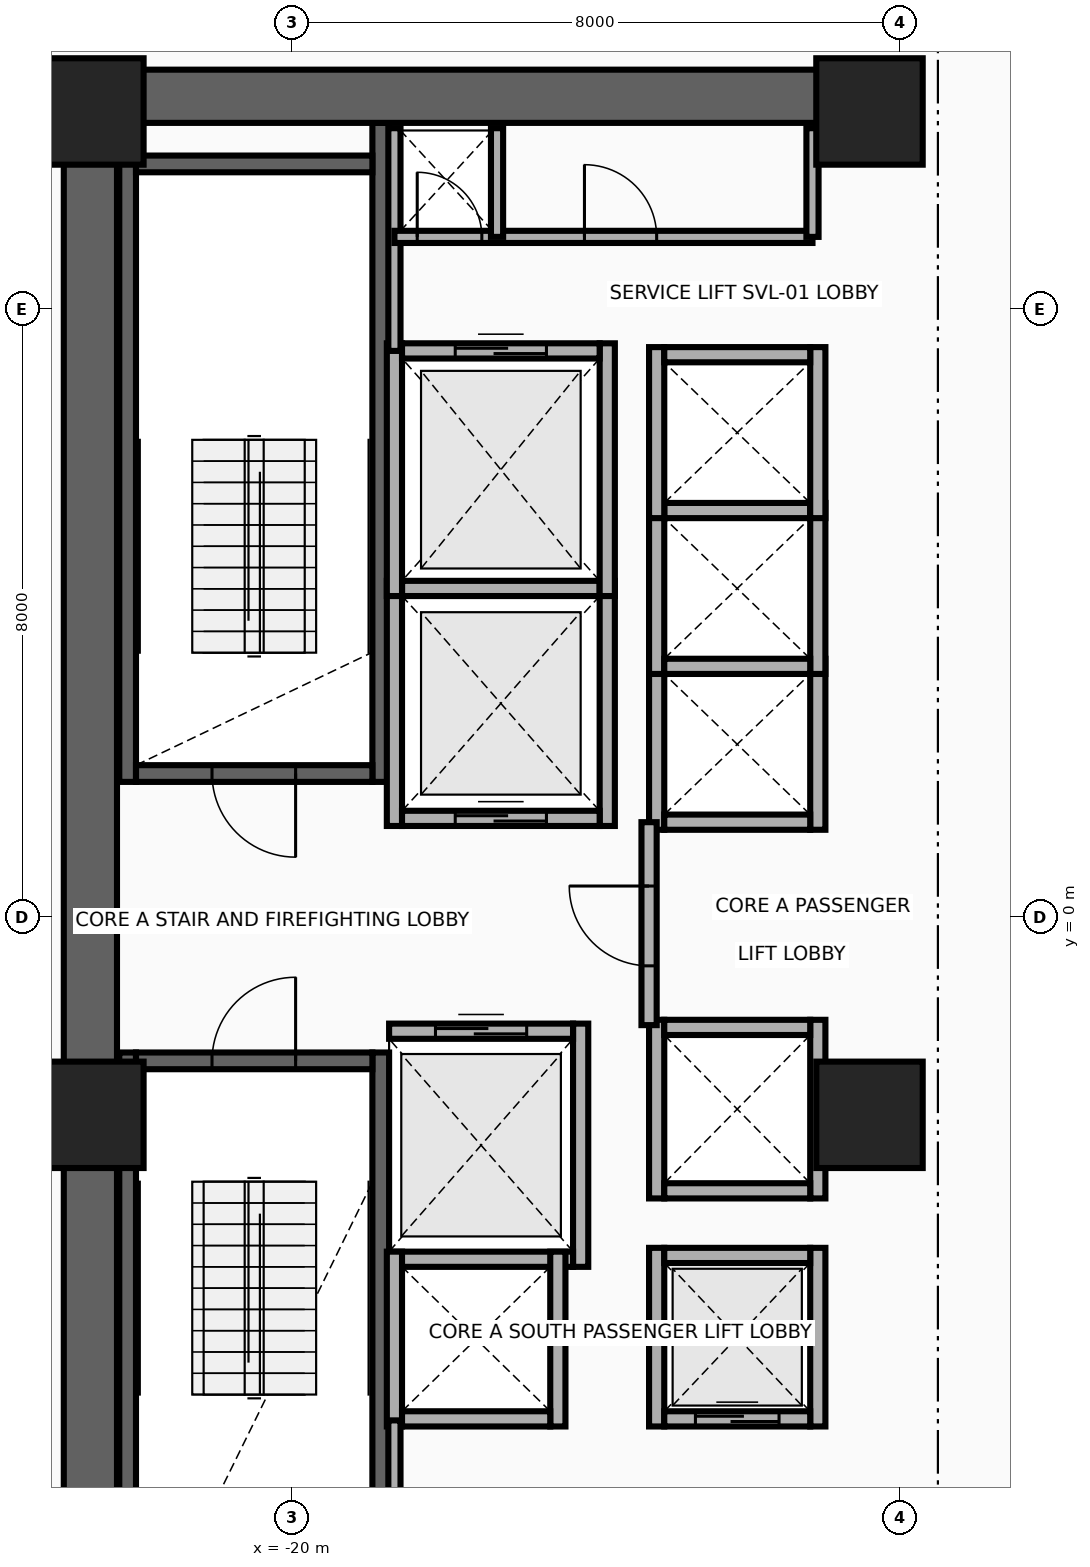
"""IFC4 building model, lengths in metres.
Left out: names, types, materials, properties, quantities, classifications, styles, units other than length and angle.
Written with IfcOpenShell. Run it as: python <this file> out.ifc"""

import sys

from ifc_helpers import new_model, si_unit, direction, frame, frame_2d, origin, origin_2d, place, context, subcontext, project, spatial, rectangle, extrude, source, transform, mapped, element, fill, save


model = new_model("IFC4")
c1 = context("Model", 3, precision=1e-05, world=origin(), true_north=direction((0.0, 1.0)))
c2 = subcontext(c1, "Body", "Model", "MODEL_VIEW")
j1 = project(units=[si_unit("LENGTHUNIT", "METRE"), si_unit("PLANEANGLEUNIT", "RADIAN")], contexts=[c1])
p1 = place(None, origin())
s1 = spatial("IfcSite", under=j1, at=p1, CompositionType="ELEMENT")
p2 = place(p1, origin())
s2 = spatial("IfcBuilding", under=s1, at=p2, CompositionType="ELEMENT")
p3 = place(p2, frame((0.0, 0.0, 51.9)))
s3 = spatial("IfcBuildingStorey", under=s2, at=p3, CompositionType="ELEMENT", Elevation=51.9)
for number, where, z_axis, x_axis in (
    (1, (-22.16, 1.78, 0.0), (0.0, 0.0, 1.0), (0.0, 1.0, 0.0)),
    (2, (-18.83, 1.78, 0.0), (0.0, 0.0, 1.0), (0.0, 1.0, 0.0)),
):
    element("IfcWall", number, at=place(p3, frame(where, z_axis=z_axis, x_axis=x_axis)), inside=s3, PredefinedType="SHEAR", context=c2, shape_type="SweptSolid", body=[
        extrude(rectangle(XDim=8.67, YDim=0.22, at=frame_2d((4.335, 0.0))), origin(), (0.0, 0.0, 1.0), 3.46),
    ])
p4 = place(p3, frame((-22.05, 1.89, 0.0), z_axis=(0.0, 0.0, 1.0), x_axis=(1.0, 0.0, 0.0)))
e3 = element("IfcWall", 3, at=p4, inside=s3, PredefinedType="SHEAR", context=c2, shape_type="SweptSolid", body=[
    extrude(rectangle(XDim=3.11, YDim=0.22, at=frame_2d((1.555, 0.0))), origin(), (0.0, 0.0, 1.0), 3.46),
])
p5 = place(p4, frame((1.0, 0.0, 0.0)))
e4 = element("IfcOpeningElement", 4, at=p5, cuts=e3, PredefinedType="OPENING", context=c2, shape_type="SweptSolid", body=[
    extrude(rectangle(XDim=1.1, YDim=2.15, at=frame_2d((0.55, 1.075))), frame((0.0, 0.125, 0.0), z_axis=(0.0, -1.0, 0.0), x_axis=(1.0, 0.0, 0.0)), (0.0, 0.0, 1.0), 0.25),
])
p6 = place(p3, frame((-22.05, 9.91, 0.0), z_axis=(0.0, 0.0, 1.0), x_axis=(1.0, 0.0, 0.0)))
e5 = element("IfcWall", 5, at=p6, inside=s3, PredefinedType="SHEAR", context=c2, shape_type="SweptSolid", body=[
    extrude(rectangle(XDim=3.11, YDim=0.22, at=frame_2d((1.555, 0.0))), origin(), (0.0, 0.0, 1.0), 3.46),
])
for number, where, z_axis, x_axis in (
    (6, (-22.16, -10.45, 0.0), (0.0, 0.0, 1.0), (0.0, 1.0, 0.0)),
    (7, (-18.83, -10.45, 0.0), (0.0, 0.0, 1.0), (0.0, 1.0, 0.0)),
):
    element("IfcWall", number, at=place(p3, frame(where, z_axis=z_axis, x_axis=x_axis)), inside=s3, PredefinedType="SHEAR", context=c2, shape_type="SweptSolid", body=[
        extrude(rectangle(XDim=8.67, YDim=0.22, at=frame_2d((4.335, 0.0))), origin(), (0.0, 0.0, 1.0), 3.46),
    ])
p7 = place(p3, frame((-22.05, -1.89, 0.0), z_axis=(0.0, 0.0, 1.0), x_axis=(1.0, 0.0, 0.0)))
e8 = element("IfcWall", 8, at=p7, inside=s3, PredefinedType="SHEAR", context=c2, shape_type="SweptSolid", body=[
    extrude(rectangle(XDim=3.11, YDim=0.22, at=frame_2d((1.555, 0.0))), origin(), (0.0, 0.0, 1.0), 3.46),
])
p8 = place(p7, frame((1.0, 0.0, 0.0)))
e9 = element("IfcOpeningElement", 9, at=p8, cuts=e8, PredefinedType="OPENING", context=c2, shape_type="SweptSolid", body=[
    extrude(rectangle(XDim=1.1, YDim=2.15, at=frame_2d((0.55, 1.075))), frame((0.0, 0.125, 0.0), z_axis=(0.0, -1.0, 0.0), x_axis=(1.0, 0.0, 0.0)), (0.0, 0.0, 1.0), 0.25),
])
p9 = place(p3, frame((-22.65, -11.15, 0.0), z_axis=(0.0, 0.0, 1.0), x_axis=(0.0, 1.0, 0.0)))
e10 = element("IfcWall", 10, at=p9, inside=s3, PredefinedType="SHEAR", context=c2, shape_type="SweptSolid", body=[
    extrude(rectangle(XDim=22.3, YDim=0.7, at=frame_2d((11.15, 0.0))), origin(), (0.0, 0.0, 1.0), 3.46),
])
p10 = place(p3, frame((-22.65, 10.8, 0.0), z_axis=(0.0, 0.0, 1.0), x_axis=(1.0, 0.0, 0.0)))
e11 = element("IfcWall", 11, at=p10, inside=s3, PredefinedType="SHEAR", context=c2, shape_type="SweptSolid", body=[
    extrude(rectangle(XDim=10.25, YDim=0.7, at=frame_2d((5.125, 0.0))), origin(), (0.0, 0.0, 1.0), 3.46),
])
m1 = source(origin(), c2, "Body", "SweptSolid", [
    extrude(rectangle(XDim=1.4, YDim=1.4, at=origin_2d()), origin(), (0.0, 0.0, 1.0), 3.7),
])
for number, where, z_axis, x_axis in (
    (12, (-22.65, -2.6, 0.0), (0.0, 0.0, 1.0), (1.0, 0.0, 0.0)),
    (13, (-12.4, -2.6, 0.0), (0.0, 0.0, 1.0), (1.0, 0.0, 0.0)),
    (14, (-22.65, 10.6, 0.0), (0.0, 0.0, 1.0), (1.0, 0.0, 0.0)),
    (15, (-12.4, 10.6, 0.0), (0.0, 0.0, 1.0), (1.0, 0.0, 0.0)),
):
    element("IfcColumn", number, at=place(p3, frame(where, z_axis=z_axis, x_axis=x_axis)), inside=s3, PredefinedType="COLUMN", context=c2, shape_type="MappedRepresentation", body=[
        mapped(m1, transform((0.0, 0.0, 0.0), x_axis=(1.0, 0.0, 0.0), y_axis=(0.0, 1.0, 0.0), z_axis=(0.0, 0.0, 1.0), scale=1.0)),
    ])
for number, where, z_axis, x_axis in (
    (16, (-18.65, 1.2, 0.0), (0.0, 0.0, 1.0), (0.0, 1.0, 0.0)),
    (17, (-15.85, 1.2, 0.0), (0.0, 0.0, 1.0), (0.0, 1.0, 0.0)),
):
    element("IfcWall", number, at=place(p3, frame(where, z_axis=z_axis, x_axis=x_axis)), inside=s3, PredefinedType="MOVABLE", context=c2, shape_type="SweptSolid", body=[
        extrude(rectangle(XDim=3.225, YDim=0.2, at=frame_2d((1.613, 0.0))), origin(), (0.0, 0.0, 1.0), 3.46),
    ])
p11 = place(p3, frame((-18.55, 1.3, 0.0), z_axis=(0.0, 0.0, 1.0), x_axis=(1.0, 0.0, 0.0)))
e18 = element("IfcWall", 18, at=p11, inside=s3, PredefinedType="MOVABLE", context=c2, shape_type="SweptSolid", body=[
    extrude(rectangle(XDim=2.6, YDim=0.2, at=frame_2d((1.3, 0.0))), origin(), (0.0, 0.0, 1.0), 3.46),
])
p12 = place(p11, frame((0.7, 0.0, 0.0)))
e19 = element("IfcOpeningElement", 19, at=p12, cuts=e18, PredefinedType="OPENING", context=c2, shape_type="SweptSolid", body=[
    extrude(rectangle(XDim=1.2, YDim=2.1, at=frame_2d((0.6, 1.05))), frame((0.0, 0.115, 0.0), z_axis=(0.0, -1.0, 0.0), x_axis=(1.0, 0.0, 0.0)), (0.0, 0.0, 1.0), 0.23),
])
p13 = place(p3, frame((-18.55, 4.325, 0.0), z_axis=(0.0, 0.0, 1.0), x_axis=(1.0, 0.0, 0.0)))
e20 = element("IfcWall", 20, at=p13, inside=s3, PredefinedType="MOVABLE", context=c2, shape_type="SweptSolid", body=[
    extrude(rectangle(XDim=2.6, YDim=0.2, at=frame_2d((1.3, 0.0))), origin(), (0.0, 0.0, 1.0), 3.46),
])
p14 = place(p3, frame((-16.2, -4.6, 0.0), z_axis=(0.0, 0.0, 1.0), x_axis=(0.0, 1.0, 0.0)))
e21 = element("IfcWall", 21, at=p14, inside=s3, PredefinedType="MOVABLE", context=c2, shape_type="SweptSolid", body=[
    extrude(rectangle(XDim=3.2, YDim=0.2, at=frame_2d((1.6, 0.0))), origin(), (0.0, 0.0, 1.0), 3.46),
])
p15 = place(p3, frame((-18.72, -4.5, 0.0), z_axis=(0.0, 0.0, 1.0), x_axis=(1.0, 0.0, 0.0)))
e22 = element("IfcWall", 22, at=p15, inside=s3, PredefinedType="MOVABLE", context=c2, shape_type="SweptSolid", body=[
    extrude(rectangle(XDim=2.42, YDim=0.2, at=frame_2d((1.21, 0.0))), origin(), (0.0, 0.0, 1.0), 3.46),
])
p16 = place(p3, frame((-18.72, -1.5, 0.0), z_axis=(0.0, 0.0, 1.0), x_axis=(1.0, 0.0, 0.0)))
e23 = element("IfcWall", 23, at=p16, inside=s3, PredefinedType="MOVABLE", context=c2, shape_type="SweptSolid", body=[
    extrude(rectangle(XDim=2.42, YDim=0.2, at=frame_2d((1.21, 0.0))), origin(), (0.0, 0.0, 1.0), 3.46),
])
p17 = place(p16, frame((0.61, 0.0, 0.0)))
e24 = element("IfcOpeningElement", 24, at=p17, cuts=e23, PredefinedType="OPENING", context=c2, shape_type="SweptSolid", body=[
    extrude(rectangle(XDim=1.2, YDim=2.1, at=frame_2d((0.6, 1.05))), frame((0.0, 0.115, 0.0), z_axis=(0.0, -1.0, 0.0), x_axis=(1.0, 0.0, 0.0)), (0.0, 0.0, 1.0), 0.23),
])
for number, where, z_axis, x_axis in (
    (25, (-18.65, 4.225, 0.0), (0.0, 0.0, 1.0), (0.0, 1.0, 0.0)),
    (26, (-15.85, 4.225, 0.0), (0.0, 0.0, 1.0), (0.0, 1.0, 0.0)),
):
    element("IfcWall", number, at=place(p3, frame(where, z_axis=z_axis, x_axis=x_axis)), inside=s3, PredefinedType="MOVABLE", context=c2, shape_type="SweptSolid", body=[
        extrude(rectangle(XDim=3.325, YDim=0.2, at=frame_2d((1.663, 0.0))), origin(), (0.0, 0.0, 1.0), 3.46),
    ])
p18 = place(p3, frame((-18.55, 7.45, 0.0), z_axis=(0.0, 0.0, 1.0), x_axis=(1.0, 0.0, 0.0)))
e27 = element("IfcWall", 27, at=p18, inside=s3, PredefinedType="MOVABLE", context=c2, shape_type="SweptSolid", body=[
    extrude(rectangle(XDim=2.6, YDim=0.2, at=frame_2d((1.3, 0.0))), origin(), (0.0, 0.0, 1.0), 3.46),
])
p19 = place(p18, frame((0.7, 0.0, 0.0)))
e28 = element("IfcOpeningElement", 28, at=p19, cuts=e27, PredefinedType="OPENING", context=c2, shape_type="SweptSolid", body=[
    extrude(rectangle(XDim=1.2, YDim=2.1, at=frame_2d((0.6, 1.05))), frame((0.0, 0.115, 0.0), z_axis=(0.0, -1.0, 0.0), x_axis=(1.0, 0.0, 0.0)), (0.0, 0.0, 1.0), 0.23),
])
for number, where, z_axis, x_axis in (
    (29, (-15.2, -6.7, 0.0), (0.0, 0.0, 1.0), (0.0, 1.0, 0.0)),
    (30, (-13.08, -6.7, 0.0), (0.0, 0.0, 1.0), (0.0, 1.0, 0.0)),
):
    element("IfcWall", number, at=place(p3, frame(where, z_axis=z_axis, x_axis=x_axis)), inside=s3, PredefinedType="MOVABLE", context=c2, shape_type="SweptSolid", body=[
        extrude(rectangle(XDim=2.35, YDim=0.2, at=frame_2d((1.175, 0.0))), origin(), (0.0, 0.0, 1.0), 3.46),
    ])
p20 = place(p3, frame((-15.1, -6.6, 0.0), z_axis=(0.0, 0.0, 1.0), x_axis=(1.0, 0.0, 0.0)))
e31 = element("IfcWall", 31, at=p20, inside=s3, PredefinedType="MOVABLE", context=c2, shape_type="SweptSolid", body=[
    extrude(rectangle(XDim=1.92, YDim=0.2, at=frame_2d((0.96, 0.0))), origin(), (0.0, 0.0, 1.0), 3.46),
])
p21 = place(p20, frame((0.41, 0.0, 0.0)))
e32 = element("IfcOpeningElement", 32, at=p21, cuts=e31, PredefinedType="OPENING", context=c2, shape_type="SweptSolid", body=[
    extrude(rectangle(XDim=1.1, YDim=2.1, at=frame_2d((0.55, 1.05))), frame((0.0, 0.115, 0.0), z_axis=(0.0, -1.0, 0.0), x_axis=(1.0, 0.0, 0.0)), (0.0, 0.0, 1.0), 0.23),
])
p22 = place(p3, frame((-15.1, -4.45, 0.0), z_axis=(0.0, 0.0, 1.0), x_axis=(1.0, 0.0, 0.0)))
e33 = element("IfcWall", 33, at=p22, inside=s3, PredefinedType="MOVABLE", context=c2, shape_type="SweptSolid", body=[
    extrude(rectangle(XDim=1.92, YDim=0.2, at=frame_2d((0.96, 0.0))), origin(), (0.0, 0.0, 1.0), 3.46),
])
for number, where, z_axis, x_axis in (
    (34, (-15.2, 1.15, 0.0), (0.0, 0.0, 1.0), (0.0, 1.0, 0.0)),
    (35, (-13.08, 1.15, 0.0), (0.0, 0.0, 1.0), (0.0, 1.0, 0.0)),
):
    element("IfcWall", number, at=place(p3, frame(where, z_axis=z_axis, x_axis=x_axis)), inside=s3, PredefinedType="MOVABLE", context=c2, shape_type="SweptSolid", body=[
        extrude(rectangle(XDim=2.25, YDim=0.2, at=frame_2d((1.125, 0.0))), origin(), (0.0, 0.0, 1.0), 3.46),
    ])
p23 = place(p3, frame((-15.1, 1.25, 0.0), z_axis=(0.0, 0.0, 1.0), x_axis=(1.0, 0.0, 0.0)))
e36 = element("IfcWall", 36, at=p23, inside=s3, PredefinedType="MOVABLE", context=c2, shape_type="SweptSolid", body=[
    extrude(rectangle(XDim=1.92, YDim=0.2, at=frame_2d((0.96, 0.0))), origin(), (0.0, 0.0, 1.0), 3.46),
])
for number, where, z_axis, x_axis in (
    (37, (-15.2, 3.2, 0.0), (0.0, 0.0, 1.0), (0.0, 1.0, 0.0)),
    (38, (-13.08, 3.2, 0.0), (0.0, 0.0, 1.0), (0.0, 1.0, 0.0)),
):
    element("IfcWall", number, at=place(p3, frame(where, z_axis=z_axis, x_axis=x_axis)), inside=s3, PredefinedType="MOVABLE", context=c2, shape_type="SweptSolid", body=[
        extrude(rectangle(XDim=2.25, YDim=0.2, at=frame_2d((1.125, 0.0))), origin(), (0.0, 0.0, 1.0), 3.46),
    ])
for number, where, z_axis, x_axis in (
    (39, (-15.1, 3.3, 0.0), (0.0, 0.0, 1.0), (1.0, 0.0, 0.0)),
    (40, (-15.1, 5.35, 0.0), (0.0, 0.0, 1.0), (1.0, 0.0, 0.0)),
):
    element("IfcWall", number, at=place(p3, frame(where, z_axis=z_axis, x_axis=x_axis)), inside=s3, PredefinedType="MOVABLE", context=c2, shape_type="SweptSolid", body=[
        extrude(rectangle(XDim=1.92, YDim=0.2, at=frame_2d((0.96, 0.0))), origin(), (0.0, 0.0, 1.0), 3.46),
    ])
for number, where, z_axis, x_axis in (
    (41, (-15.2, 5.25, 0.0), (0.0, 0.0, 1.0), (0.0, 1.0, 0.0)),
    (42, (-13.08, 5.25, 0.0), (0.0, 0.0, 1.0), (0.0, 1.0, 0.0)),
):
    element("IfcWall", number, at=place(p3, frame(where, z_axis=z_axis, x_axis=x_axis)), inside=s3, PredefinedType="MOVABLE", context=c2, shape_type="SweptSolid", body=[
        extrude(rectangle(XDim=2.25, YDim=0.2, at=frame_2d((1.125, 0.0))), origin(), (0.0, 0.0, 1.0), 3.46),
    ])
p24 = place(p3, frame((-15.1, 7.4, 0.0), z_axis=(0.0, 0.0, 1.0), x_axis=(1.0, 0.0, 0.0)))
e43 = element("IfcWall", 43, at=p24, inside=s3, PredefinedType="MOVABLE", context=c2, shape_type="SweptSolid", body=[
    extrude(rectangle(XDim=1.92, YDim=0.2, at=frame_2d((0.96, 0.0))), origin(), (0.0, 0.0, 1.0), 3.46),
])
for number, where, z_axis, x_axis in (
    (44, (-18.65, -6.7, 0.0), (0.0, 0.0, 1.0), (0.0, 1.0, 0.0)),
    (45, (-16.5, -6.7, 0.0), (0.0, 0.0, 1.0), (0.0, 1.0, 0.0)),
):
    element("IfcWall", number, at=place(p3, frame(where, z_axis=z_axis, x_axis=x_axis)), inside=s3, PredefinedType="MOVABLE", context=c2, shape_type="SweptSolid", body=[
        extrude(rectangle(XDim=2.3, YDim=0.2, at=frame_2d((1.15, 0.0))), origin(), (0.0, 0.0, 1.0), 3.46),
    ])
p25 = place(p3, frame((-18.55, -6.6, 0.0), z_axis=(0.0, 0.0, 1.0), x_axis=(1.0, 0.0, 0.0)))
e46 = element("IfcWall", 46, at=p25, inside=s3, PredefinedType="MOVABLE", context=c2, shape_type="SweptSolid", body=[
    extrude(rectangle(XDim=1.95, YDim=0.2, at=frame_2d((0.975, 0.0))), origin(), (0.0, 0.0, 1.0), 3.46),
])
for number, where, z_axis, x_axis in (
    (47, (-15.2, -3.7, 0.0), (0.0, 0.0, 1.0), (0.0, 1.0, 0.0)),
    (48, (-13.08, -3.7, 0.0), (0.0, 0.0, 1.0), (0.0, 1.0, 0.0)),
):
    element("IfcWall", number, at=place(p3, frame(where, z_axis=z_axis, x_axis=x_axis)), inside=s3, PredefinedType="MOVABLE", context=c2, shape_type="SweptSolid", body=[
        extrude(rectangle(XDim=2.35, YDim=0.2, at=frame_2d((1.175, 0.0))), origin(), (0.0, 0.0, 1.0), 3.46),
    ])
for number, where, z_axis, x_axis in (
    (49, (-15.1, -3.6, 0.0), (0.0, 0.0, 1.0), (1.0, 0.0, 0.0)),
    (50, (-15.1, -1.45, 0.0), (0.0, 0.0, 1.0), (1.0, 0.0, 0.0)),
):
    element("IfcWall", number, at=place(p3, frame(where, z_axis=z_axis, x_axis=x_axis)), inside=s3, PredefinedType="MOVABLE", context=c2, shape_type="SweptSolid", body=[
        extrude(rectangle(XDim=1.92, YDim=0.2, at=frame_2d((0.96, 0.0))), origin(), (0.0, 0.0, 1.0), 3.46),
    ])
p26 = place(p3, frame((-15.3, -1.42, 0.0), z_axis=(0.0, 0.0, 1.0), x_axis=(0.0, 1.0, 0.0)))
e51 = element("IfcWall", 51, at=p26, inside=s3, PredefinedType="PARTITIONING", context=c2, shape_type="SweptSolid", body=[
    extrude(rectangle(XDim=2.67, YDim=0.2, at=frame_2d((1.335, 0.0))), origin(), (0.0, 0.0, 1.0), 3.46),
])
p27 = place(p26, frame((0.78, 0.0, 0.0)))
e52 = element("IfcOpeningElement", 52, at=p27, cuts=e51, PredefinedType="OPENING", context=c2, shape_type="SweptSolid", body=[
    extrude(rectangle(XDim=1.05, YDim=2.15, at=frame_2d((0.525, 1.075))), frame((0.0, 0.115, 0.0), z_axis=(0.0, -1.0, 0.0), x_axis=(1.0, 0.0, 0.0)), (0.0, 0.0, 1.0), 0.23),
])
p28 = place(p3, frame((-18.65, 7.45, 0.0), z_axis=(0.0, 0.0, 1.0), x_axis=(0.0, 1.0, 0.0)))
e53 = element("IfcWall", 53, at=p28, inside=s3, PredefinedType="PARTITIONING", context=c2, shape_type="SweptSolid", body=[
    extrude(rectangle(XDim=2.93, YDim=0.16, at=frame_2d((1.465, 0.0))), origin(), (0.0, 0.0, 1.0), 3.46),
])
p29 = place(p3, frame((-18.65, -8.18, 0.0), z_axis=(0.0, 0.0, 1.0), x_axis=(0.0, 1.0, 0.0)))
e54 = element("IfcWall", 54, at=p29, inside=s3, PredefinedType="PARTITIONING", context=c2, shape_type="SweptSolid", body=[
    extrude(rectangle(XDim=1.56, YDim=0.16, at=frame_2d((0.78, 0.0))), origin(), (0.0, 0.0, 1.0), 3.46),
])
p30 = place(p3, frame((-18.65, 8.95, 0.0), z_axis=(0.0, 0.0, 1.0), x_axis=(1.0, 0.0, 0.0)))
e55 = element("IfcWall", 55, at=p30, inside=s3, PredefinedType="PARTITIONING", context=c2, shape_type="SweptSolid", body=[
    extrude(rectangle(XDim=5.5, YDim=0.16, at=frame_2d((2.75, 0.0))), origin(), (0.0, 0.0, 1.0), 3.46),
])
p31 = place(p30, frame((0.3, 0.0, 0.0)))
e56 = element("IfcOpeningElement", 56, at=p31, cuts=e55, PredefinedType="OPENING", context=c2, shape_type="SweptSolid", body=[
    extrude(rectangle(XDim=0.85, YDim=2.05, at=frame_2d((0.425, 1.025))), frame((0.0, 0.095, 0.0), z_axis=(0.0, -1.0, 0.0), x_axis=(1.0, 0.0, 0.0)), (0.0, 0.0, 1.0), 0.19),
])
p32 = place(p30, frame((2.5, 0.0, 0.0)))
e57 = element("IfcOpeningElement", 57, at=p32, cuts=e55, PredefinedType="OPENING", context=c2, shape_type="SweptSolid", body=[
    extrude(rectangle(XDim=0.95, YDim=2.15, at=frame_2d((0.475, 1.075))), frame((0.0, 0.095, 0.0), z_axis=(0.0, -1.0, 0.0), x_axis=(1.0, 0.0, 0.0)), (0.0, 0.0, 1.0), 0.19),
])
for number, where, z_axis, x_axis in (
    (58, (-13.15, 8.95, 0.0), (0.0, 0.0, 1.0), (0.0, 1.0, 0.0)),
    (59, (-17.3, 8.95, 0.0), (0.0, 0.0, 1.0), (0.0, 1.0, 0.0)),
):
    element("IfcWall", number, at=place(p3, frame(where, z_axis=z_axis, x_axis=x_axis)), inside=s3, PredefinedType="PARTITIONING", context=c2, shape_type="SweptSolid", body=[
        extrude(rectangle(XDim=1.43, YDim=0.16, at=frame_2d((0.715, 0.0))), origin(), (0.0, 0.0, 1.0), 3.46),
    ])
p33 = place(p12, origin())
e60 = element("IfcDoor", 60, at=p33, inside=s3, OperationType="DOUBLE_DOOR_SLIDING", PredefinedType="DOOR", context=c2, shape_type="SweptSolid", body=[
    extrude(rectangle(XDim=1.2, YDim=2.1, at=frame_2d((0.6, 1.05))), frame((0.0, 0.025, 0.0), z_axis=(0.0, -1.0, 0.0), x_axis=(1.0, 0.0, 0.0)), (0.0, 0.0, 1.0), 0.05),
])
fill(e19, e60)
p34 = place(p17, origin())
e61 = element("IfcDoor", 61, at=p34, inside=s3, OperationType="DOUBLE_DOOR_SLIDING", PredefinedType="DOOR", context=c2, shape_type="SweptSolid", body=[
    extrude(rectangle(XDim=1.2, YDim=2.1, at=frame_2d((0.6, 1.05))), frame((0.0, 0.025, 0.0), z_axis=(0.0, -1.0, 0.0), x_axis=(1.0, 0.0, 0.0)), (0.0, 0.0, 1.0), 0.05),
])
fill(e24, e61)
p35 = place(p19, origin())
e62 = element("IfcDoor", 62, at=p35, inside=s3, OperationType="DOUBLE_DOOR_SLIDING", PredefinedType="DOOR", context=c2, shape_type="SweptSolid", body=[
    extrude(rectangle(XDim=1.2, YDim=2.1, at=frame_2d((0.6, 1.05))), frame((0.0, 0.025, 0.0), z_axis=(0.0, -1.0, 0.0), x_axis=(1.0, 0.0, 0.0)), (0.0, 0.0, 1.0), 0.05),
])
fill(e28, e62)
p36 = place(p21, origin())
e63 = element("IfcDoor", 63, at=p36, inside=s3, OperationType="DOUBLE_DOOR_SLIDING", PredefinedType="DOOR", context=c2, shape_type="SweptSolid", body=[
    extrude(rectangle(XDim=1.1, YDim=2.1, at=frame_2d((0.55, 1.05))), frame((0.0, 0.025, 0.0), z_axis=(0.0, -1.0, 0.0), x_axis=(1.0, 0.0, 0.0)), (0.0, 0.0, 1.0), 0.05),
])
fill(e32, e63)
p37 = place(p27, origin())
e64 = element("IfcDoor", 64, at=p37, inside=s3, OperationType="SINGLE_SWING_RIGHT", PredefinedType="DOOR", context=c2, shape_type="SweptSolid", body=[
    extrude(rectangle(XDim=1.05, YDim=2.15, at=frame_2d((0.525, 1.075))), frame((0.0, 0.025, 0.0), z_axis=(0.0, -1.0, 0.0), x_axis=(1.0, 0.0, 0.0)), (0.0, 0.0, 1.0), 0.05),
])
fill(e52, e64)
p38 = place(p5, frame((1.1, 0.0, 0.0), z_axis=(0.0, 0.0, 1.0), x_axis=(-1.0, 0.0, 0.0)))
e65 = element("IfcDoor", 65, at=p38, inside=s3, OperationType="SINGLE_SWING_LEFT", PredefinedType="DOOR", context=c2, shape_type="SweptSolid", body=[
    extrude(rectangle(XDim=1.1, YDim=2.15, at=frame_2d((0.55, 1.075))), frame((0.0, 0.025, 0.0), z_axis=(0.0, -1.0, 0.0), x_axis=(1.0, 0.0, 0.0)), (0.0, 0.0, 1.0), 0.05),
])
fill(e4, e65)
p39 = place(p8, origin())
e66 = element("IfcDoor", 66, at=p39, inside=s3, OperationType="SINGLE_SWING_RIGHT", PredefinedType="DOOR", context=c2, shape_type="SweptSolid", body=[
    extrude(rectangle(XDim=1.1, YDim=2.15, at=frame_2d((0.55, 1.075))), frame((0.0, 0.025, 0.0), z_axis=(0.0, -1.0, 0.0), x_axis=(1.0, 0.0, 0.0)), (0.0, 0.0, 1.0), 0.05),
])
fill(e9, e66)
p40 = place(p31, origin())
e67 = element("IfcDoor", 67, at=p40, inside=s3, OperationType="SINGLE_SWING_LEFT", PredefinedType="DOOR", context=c2, shape_type="SweptSolid", body=[
    extrude(rectangle(XDim=0.85, YDim=2.05, at=frame_2d((0.425, 1.025))), frame((0.0, 0.025, 0.0), z_axis=(0.0, -1.0, 0.0), x_axis=(1.0, 0.0, 0.0)), (0.0, 0.0, 1.0), 0.05),
])
fill(e56, e67)
p41 = place(p32, origin())
e68 = element("IfcDoor", 68, at=p41, inside=s3, OperationType="SINGLE_SWING_RIGHT", PredefinedType="DOOR", context=c2, shape_type="SweptSolid", body=[
    extrude(rectangle(XDim=0.95, YDim=2.15, at=frame_2d((0.475, 1.075))), frame((0.0, 0.025, 0.0), z_axis=(0.0, -1.0, 0.0), x_axis=(1.0, 0.0, 0.0)), (0.0, 0.0, 1.0), 0.05),
])
fill(e57, e68)
save(model, sys.argv[1])
